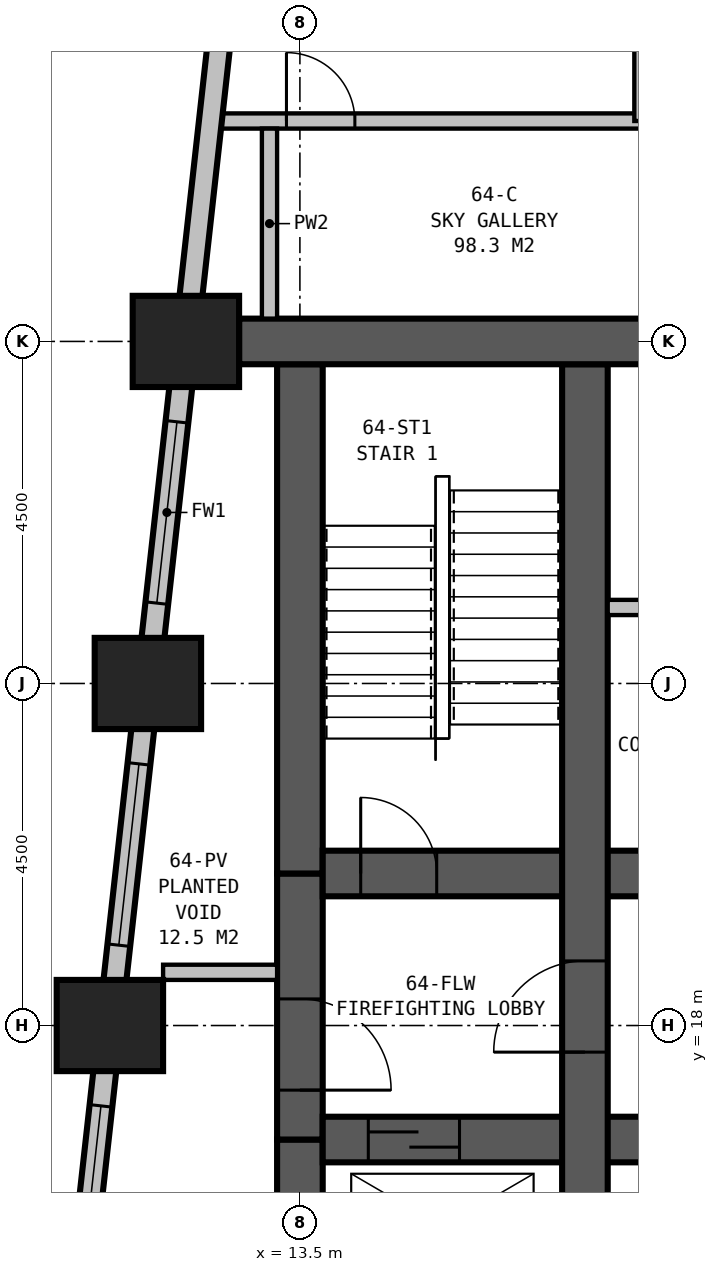
"""IFC4 building model, lengths in metres.
Left out: names, types, materials, properties, quantities, classifications, styles, units other than length and angle.
Written with IfcOpenShell. Run it as: python <this file> out.ifc"""

import sys

from ifc_helpers import new_model, si_unit, direction, frame, frame_2d, origin, origin_2d, place, context, subcontext, project, spatial, rectangle, extrude, element, fill, save


model = new_model("IFC4")
c1 = context("Model", 3, precision=1e-05, world=origin(), true_north=direction((0.0, 1.0)))
c2 = subcontext(c1, "Body", "Model", "MODEL_VIEW")
j1 = project(units=[si_unit("LENGTHUNIT", "METRE"), si_unit("PLANEANGLEUNIT", "RADIAN")], contexts=[c1])
p1 = place(None, origin())
s1 = spatial("IfcSite", under=j1, at=p1, CompositionType="ELEMENT")
p2 = place(p1, origin())
s2 = spatial("IfcBuilding", under=s1, at=p2, CompositionType="ELEMENT")
p3 = place(p2, frame((0.0, 0.0, 250.7)))
s3 = spatial("IfcBuildingStorey", under=s2, at=p3, CompositionType="ELEMENT", Elevation=250.7)
for number, where, z_axis, x_axis in (
    (1, (12.0, 27.0, 0.0), (0.0, 0.0, 1.0), (1.0, 0.0, 0.0)),
    (2, (11.5, 22.5, 0.0), (0.0, 0.0, 1.0), (1.0, 0.0, 0.0)),
    (3, (11.0, 18.0, 0.0), (0.0, 0.0, 1.0), (1.0, 0.0, 0.0)),
):
    element("IfcColumn", number, at=place(p3, frame(where, z_axis=z_axis, x_axis=x_axis)), inside=s3, PredefinedType="COLUMN", context=c2, shape_type="SweptSolid", body=[
        extrude(rectangle(XDim=1.4, YDim=1.2, at=origin_2d()), origin(), (0.0, 0.0, 1.0), 3.9),
    ])
p4 = place(p3, frame((36.3, 27.0, 0.0), z_axis=(0.0, 0.0, 1.0), x_axis=(-1.0, 0.0, 0.0)))
e4 = element("IfcWall", 4, at=p4, inside=s3, PredefinedType="SHEAR", context=c2, shape_type="SweptSolid", body=[
    extrude(rectangle(XDim=23.6, YDim=0.6, at=frame_2d((11.8, 0.0))), origin(), (0.0, 0.0, 1.0), 3.9),
])
p5 = place(p4, frame((17.05, 0.0, 0.0)))
e5 = element("IfcOpeningElement", 5, at=p5, cuts=e4, PredefinedType="OPENING", context=c2, shape_type="SweptSolid", body=[
    extrude(rectangle(XDim=1.0, YDim=2.1, at=frame_2d((0.5, 1.05))), frame((0.0, 0.31, 0.0), z_axis=(0.0, -1.0, 0.0), x_axis=(1.0, 0.0, 0.0)), (0.0, 0.0, 1.0), 0.62),
])
p6 = place(p4, frame((12.05, 0.0, 0.0)))
e6 = element("IfcOpeningElement", 6, at=p6, cuts=e4, PredefinedType="OPENING", context=c2, shape_type="SweptSolid", body=[
    extrude(rectangle(XDim=1.0, YDim=2.1, at=frame_2d((0.5, 1.05))), frame((0.0, 0.31, 0.0), z_axis=(0.0, -1.0, 0.0), x_axis=(1.0, 0.0, 0.0)), (0.0, 0.0, 1.0), 0.62),
])
p7 = place(p4, frame((7.05, 0.0, 0.0)))
e7 = element("IfcOpeningElement", 7, at=p7, cuts=e4, PredefinedType="OPENING", context=c2, shape_type="SweptSolid", body=[
    extrude(rectangle(XDim=1.0, YDim=2.1, at=frame_2d((0.5, 1.05))), frame((0.0, 0.31, 0.0), z_axis=(0.0, -1.0, 0.0), x_axis=(1.0, 0.0, 0.0)), (0.0, 0.0, 1.0), 0.62),
])
p8 = place(p3, frame((17.25, 13.8, 0.0), z_axis=(0.0, 0.0, 1.0), x_axis=(0.0, 1.0, 0.0)))
e8 = element("IfcWall", 8, at=p8, inside=s3, PredefinedType="SHEAR", context=c2, shape_type="SweptSolid", body=[
    extrude(rectangle(XDim=12.9, YDim=0.6, at=frame_2d((6.45, 0.0))), origin(), (0.0, 0.0, 1.0), 3.9),
])
p9 = place(p8, frame((3.85, 0.0, 0.0)))
e9 = element("IfcOpeningElement", 9, at=p9, cuts=e8, PredefinedType="OPENING", context=c2, shape_type="SweptSolid", body=[
    extrude(rectangle(XDim=1.2, YDim=2.1, at=frame_2d((0.6, 1.05))), frame((0.0, 0.31, 0.0), z_axis=(0.0, -1.0, 0.0), x_axis=(1.0, 0.0, 0.0)), (0.0, 0.0, 1.0), 0.62),
])
p10 = place(p3, frame((13.8, 16.5, 0.0), z_axis=(0.0, 0.0, 1.0), x_axis=(1.0, 0.0, 0.0)))
e10 = element("IfcWall", 10, at=p10, inside=s3, PredefinedType="SHEAR", context=c2, shape_type="SweptSolid", body=[
    extrude(rectangle(XDim=21.9, YDim=0.6, at=frame_2d((10.95, 0.0))), origin(), (0.0, 0.0, 1.0), 3.9),
])
p11 = place(p10, frame((5.75, 0.0, 0.0), z_axis=(0.0, 0.0, 1.0), x_axis=(-1.0, 0.0, 0.0)))
e11 = element("IfcOpeningElement", 11, at=p11, cuts=e10, PredefinedType="OPENING", context=c2, shape_type="SweptSolid", body=[
    extrude(rectangle(XDim=1.0, YDim=2.1, at=frame_2d((0.5, 1.05))), frame((0.0, 0.31, 0.0), z_axis=(0.0, -1.0, 0.0), x_axis=(1.0, 0.0, 0.0)), (0.0, 0.0, 1.0), 0.62),
])
p12 = place(p10, frame((10.2, 0.0, 0.0), z_axis=(0.0, 0.0, 1.0), x_axis=(-1.0, 0.0, 0.0)))
e12 = element("IfcOpeningElement", 12, at=p12, cuts=e10, PredefinedType="OPENING", context=c2, shape_type="SweptSolid", body=[
    extrude(rectangle(XDim=1.0, YDim=2.1, at=frame_2d((0.5, 1.05))), frame((0.0, 0.31, 0.0), z_axis=(0.0, -1.0, 0.0), x_axis=(1.0, 0.0, 0.0)), (0.0, 0.0, 1.0), 0.62),
])
p13 = place(p10, frame((12.7, 0.0, 0.0), z_axis=(0.0, 0.0, 1.0), x_axis=(-1.0, 0.0, 0.0)))
e13 = element("IfcOpeningElement", 13, at=p13, cuts=e10, PredefinedType="OPENING", context=c2, shape_type="SweptSolid", body=[
    extrude(rectangle(XDim=1.0, YDim=2.1, at=frame_2d((0.5, 1.05))), frame((0.0, 0.31, 0.0), z_axis=(0.0, -1.0, 0.0), x_axis=(1.0, 0.0, 0.0)), (0.0, 0.0, 1.0), 0.62),
])
p14 = place(p10, frame((17.15, 0.0, 0.0), z_axis=(0.0, 0.0, 1.0), x_axis=(-1.0, 0.0, 0.0)))
e14 = element("IfcOpeningElement", 14, at=p14, cuts=e10, PredefinedType="OPENING", context=c2, shape_type="SweptSolid", body=[
    extrude(rectangle(XDim=1.0, YDim=2.1, at=frame_2d((0.5, 1.05))), frame((0.0, 0.31, 0.0), z_axis=(0.0, -1.0, 0.0), x_axis=(1.0, 0.0, 0.0)), (0.0, 0.0, 1.0), 0.62),
])
p15 = place(p10, frame((0.6, 0.0, 0.0)))
e15 = element("IfcOpeningElement", 15, at=p15, cuts=e10, PredefinedType="OPENING", context=c2, shape_type="SweptSolid", body=[
    extrude(rectangle(XDim=1.2, YDim=2.1, at=frame_2d((0.6, 1.05))), frame((0.0, 0.31, 0.0), z_axis=(0.0, -1.0, 0.0), x_axis=(1.0, 0.0, 0.0)), (0.0, 0.0, 1.0), 0.62),
])
p16 = place(p10, frame((19.6, 0.0, 0.0)))
e16 = element("IfcOpeningElement", 16, at=p16, cuts=e10, PredefinedType="OPENING", context=c2, shape_type="SweptSolid", body=[
    extrude(rectangle(XDim=1.2, YDim=2.1, at=frame_2d((0.6, 1.05))), frame((0.0, 0.31, 0.0), z_axis=(0.0, -1.0, 0.0), x_axis=(1.0, 0.0, 0.0)), (0.0, 0.0, 1.0), 0.62),
])
p17 = place(p3, frame((13.8, 20.0, 0.0), z_axis=(0.0, 0.0, 1.0), x_axis=(1.0, 0.0, 0.0)))
e17 = element("IfcWall", 17, at=p17, inside=s3, PredefinedType="SHEAR", context=c2, shape_type="SweptSolid", body=[
    extrude(rectangle(XDim=21.9, YDim=0.6, at=frame_2d((10.95, 0.0))), origin(), (0.0, 0.0, 1.0), 3.9),
])
p18 = place(p17, frame((0.5, 0.0, 0.0)))
e18 = element("IfcOpeningElement", 18, at=p18, cuts=e17, PredefinedType="OPENING", context=c2, shape_type="SweptSolid", body=[
    extrude(rectangle(XDim=1.0, YDim=2.1, at=frame_2d((0.5, 1.05))), frame((0.0, 0.31, 0.0), z_axis=(0.0, -1.0, 0.0), x_axis=(1.0, 0.0, 0.0)), (0.0, 0.0, 1.0), 0.62),
])
p19 = place(p17, frame((20.5, 0.0, 0.0)))
e19 = element("IfcOpeningElement", 19, at=p19, cuts=e17, PredefinedType="OPENING", context=c2, shape_type="SweptSolid", body=[
    extrude(rectangle(XDim=1.0, YDim=2.1, at=frame_2d((0.5, 1.05))), frame((0.0, 0.31, 0.0), z_axis=(0.0, -1.0, 0.0), x_axis=(1.0, 0.0, 0.0)), (0.0, 0.0, 1.0), 0.62),
])
p20 = place(p17, frame((9.15, 0.0, 0.0)))
e20 = element("IfcOpeningElement", 20, at=p20, cuts=e17, PredefinedType="OPENING", context=c2, shape_type="SweptSolid", body=[
    extrude(rectangle(XDim=1.1, YDim=2.1, at=frame_2d((0.55, 1.05))), frame((0.0, 0.31, 0.0), z_axis=(0.0, -1.0, 0.0), x_axis=(1.0, 0.0, 0.0)), (0.0, 0.0, 1.0), 0.62),
])
p21 = place(p17, frame((11.65, 0.0, 0.0)))
e21 = element("IfcOpeningElement", 21, at=p21, cuts=e17, PredefinedType="OPENING", context=c2, shape_type="SweptSolid", body=[
    extrude(rectangle(XDim=1.1, YDim=2.1, at=frame_2d((0.55, 1.05))), frame((0.0, 0.31, 0.0), z_axis=(0.0, -1.0, 0.0), x_axis=(1.0, 0.0, 0.0)), (0.0, 0.0, 1.0), 0.62),
])
p22 = place(p17, frame((14.15, 0.0, 0.0)))
e22 = element("IfcOpeningElement", 22, at=p22, cuts=e17, PredefinedType="OPENING", context=c2, shape_type="SweptSolid", body=[
    extrude(rectangle(XDim=1.1, YDim=2.1, at=frame_2d((0.55, 1.05))), frame((0.0, 0.31, 0.0), z_axis=(0.0, -1.0, 0.0), x_axis=(1.0, 0.0, 0.0)), (0.0, 0.0, 1.0), 0.62),
])
p23 = place(p17, frame((16.65, 0.0, 0.0)))
e23 = element("IfcOpeningElement", 23, at=p23, cuts=e17, PredefinedType="OPENING", context=c2, shape_type="SweptSolid", body=[
    extrude(rectangle(XDim=1.1, YDim=2.1, at=frame_2d((0.55, 1.05))), frame((0.0, 0.31, 0.0), z_axis=(0.0, -1.0, 0.0), x_axis=(1.0, 0.0, 0.0)), (0.0, 0.0, 1.0), 0.62),
])
p24 = place(p17, frame((5.75, 0.0, 0.0), z_axis=(0.0, 0.0, 1.0), x_axis=(-1.0, 0.0, 0.0)))
e24 = element("IfcOpeningElement", 24, at=p24, cuts=e17, PredefinedType="OPENING", context=c2, shape_type="SweptSolid", body=[
    extrude(rectangle(XDim=1.0, YDim=2.1, at=frame_2d((0.5, 1.05))), frame((0.0, 0.31, 0.0), z_axis=(0.0, -1.0, 0.0), x_axis=(1.0, 0.0, 0.0)), (0.0, 0.0, 1.0), 0.62),
])
p25 = place(p17, frame((6.7, 0.0, 0.0)))
e25 = element("IfcOpeningElement", 25, at=p25, cuts=e17, PredefinedType="OPENING", context=c2, shape_type="SweptSolid", body=[
    extrude(rectangle(XDim=1.0, YDim=2.1, at=frame_2d((0.5, 1.05))), frame((0.0, 0.31, 0.0), z_axis=(0.0, -1.0, 0.0), x_axis=(1.0, 0.0, 0.0)), (0.0, 0.0, 1.0), 0.62),
])
p26 = place(p3, frame((13.5, 26.7, 0.0), z_axis=(0.0, 0.0, 1.0), x_axis=(0.0, -1.0, 0.0)))
e26 = element("IfcWall", 26, at=p26, inside=s3, PredefinedType="SHEAR", context=c2, shape_type="SweptSolid", body=[
    extrude(rectangle(XDim=6.7, YDim=0.6, at=frame_2d((3.35, 0.0))), origin(), (0.0, 0.0, 1.0), 3.9),
])
p27 = place(p3, frame((13.5, 20.0, 0.0), z_axis=(0.0, 0.0, 1.0), x_axis=(0.0, -1.0, 0.0)))
e27 = element("IfcWall", 27, at=p27, inside=s3, PredefinedType="SHEAR", context=c2, shape_type="SweptSolid", body=[
    extrude(rectangle(XDim=3.5, YDim=0.6, at=frame_2d((1.75, 0.0))), origin(), (0.0, 0.0, 1.0), 3.9),
])
p28 = place(p27, frame((1.65, 0.0, 0.0)))
e28 = element("IfcOpeningElement", 28, at=p28, cuts=e27, PredefinedType="OPENING", context=c2, shape_type="SweptSolid", body=[
    extrude(rectangle(XDim=1.2, YDim=2.1, at=frame_2d((0.6, 1.05))), frame((0.0, 0.31, 0.0), z_axis=(0.0, -1.0, 0.0), x_axis=(1.0, 0.0, 0.0)), (0.0, 0.0, 1.0), 0.62),
])
p29 = place(p3, frame((13.5, 16.5, 0.0), z_axis=(0.0, 0.0, 1.0), x_axis=(0.0, -1.0, 0.0)))
e29 = element("IfcWall", 29, at=p29, inside=s3, PredefinedType="SHEAR", context=c2, shape_type="SweptSolid", body=[
    extrude(rectangle(XDim=2.7, YDim=0.6, at=frame_2d((1.35, 0.0))), origin(), (0.0, 0.0, 1.0), 3.9),
])
p30 = place(p3, frame((13.517, 40.649, 0.0), z_axis=(0.0, 0.0, 1.0), x_axis=(-0.110433201132, -0.993883548555, 0.0)))
e30 = element("IfcWall", 30, at=p30, inside=s3, PredefinedType="STANDARD", context=c2, shape_type="SweptSolid", body=[
    extrude(rectangle(XDim=31.994, YDim=0.3, at=frame_2d((15.997, 0.0))), origin(), (0.0, 0.0, 1.0), 2.65),
])
p31 = place(p30, frame((1.214, 0.0, 0.5)))
e31 = element("IfcOpeningElement", 31, at=p31, cuts=e30, PredefinedType="OPENING", context=c2, shape_type="SweptSolid", body=[
    extrude(rectangle(XDim=2.4, YDim=2.0, at=frame_2d((1.2, 1.0))), frame((0.0, 0.16, 0.0), z_axis=(0.0, -1.0, 0.0), x_axis=(1.0, 0.0, 0.0)), (0.0, 0.0, 1.0), 0.32),
])
p32 = place(p30, frame((5.742, 0.0, 0.5)))
e32 = element("IfcOpeningElement", 32, at=p32, cuts=e30, PredefinedType="OPENING", context=c2, shape_type="SweptSolid", body=[
    extrude(rectangle(XDim=2.4, YDim=2.0, at=frame_2d((1.2, 1.0))), frame((0.0, 0.16, 0.0), z_axis=(0.0, -1.0, 0.0), x_axis=(1.0, 0.0, 0.0)), (0.0, 0.0, 1.0), 0.32),
])
p33 = place(p30, frame((14.797, 0.0, 0.5)))
e33 = element("IfcOpeningElement", 33, at=p33, cuts=e30, PredefinedType="OPENING", context=c2, shape_type="SweptSolid", body=[
    extrude(rectangle(XDim=2.4, YDim=2.0, at=frame_2d((1.2, 1.0))), frame((0.0, 0.16, 0.0), z_axis=(0.0, -1.0, 0.0), x_axis=(1.0, 0.0, 0.0)), (0.0, 0.0, 1.0), 0.32),
])
p34 = place(p30, frame((19.325, 0.0, 0.5)))
e34 = element("IfcOpeningElement", 34, at=p34, cuts=e30, PredefinedType="OPENING", context=c2, shape_type="SweptSolid", body=[
    extrude(rectangle(XDim=2.4, YDim=2.0, at=frame_2d((1.2, 1.0))), frame((0.0, 0.16, 0.0), z_axis=(0.0, -1.0, 0.0), x_axis=(1.0, 0.0, 0.0)), (0.0, 0.0, 1.0), 0.32),
])
p35 = place(p30, frame((23.852, 0.0, 0.5)))
e35 = element("IfcOpeningElement", 35, at=p35, cuts=e30, PredefinedType="OPENING", context=c2, shape_type="SweptSolid", body=[
    extrude(rectangle(XDim=2.4, YDim=2.0, at=frame_2d((1.2, 1.0))), frame((0.0, 0.16, 0.0), z_axis=(0.0, -1.0, 0.0), x_axis=(1.0, 0.0, 0.0)), (0.0, 0.0, 1.0), 0.32),
])
p36 = place(p30, frame((28.38, 0.0, 0.5)))
e36 = element("IfcOpeningElement", 36, at=p36, cuts=e30, PredefinedType="OPENING", context=c2, shape_type="SweptSolid", body=[
    extrude(rectangle(XDim=2.4, YDim=2.0, at=frame_2d((1.2, 1.0))), frame((0.0, 0.16, 0.0), z_axis=(0.0, -1.0, 0.0), x_axis=(1.0, 0.0, 0.0)), (0.0, 0.0, 1.0), 0.32),
])
p37 = place(p3, frame((12.473, 29.9, 0.0), z_axis=(0.0, 0.0, 1.0), x_axis=(1.0, 0.0, 0.0)))
e37 = element("IfcWall", 37, at=p37, inside=s3, PredefinedType="PARTITIONING", context=c2, shape_type="SweptSolid", body=[
    extrude(rectangle(XDim=25.827, YDim=0.2, at=frame_2d((12.914, 0.0))), origin(), (0.0, 0.0, 1.0), 3.65),
])
p38 = place(p37, frame((0.85, 0.0, 0.0)))
e38 = element("IfcOpeningElement", 38, at=p38, cuts=e37, PredefinedType="OPENING", context=c2, shape_type="SweptSolid", body=[
    extrude(rectangle(XDim=0.9, YDim=2.1, at=frame_2d((0.45, 1.05))), frame((0.0, 0.11, 0.0), z_axis=(0.0, -1.0, 0.0), x_axis=(1.0, 0.0, 0.0)), (0.0, 0.0, 1.0), 0.22),
])
p39 = place(p37, frame((8.677, 0.0, 0.0)))
e39 = element("IfcOpeningElement", 39, at=p39, cuts=e37, PredefinedType="OPENING", context=c2, shape_type="SweptSolid", body=[
    extrude(rectangle(XDim=0.9, YDim=2.1, at=frame_2d((0.45, 1.05))), frame((0.0, 0.11, 0.0), z_axis=(0.0, -1.0, 0.0), x_axis=(1.0, 0.0, 0.0)), (0.0, 0.0, 1.0), 0.22),
])
p40 = place(p37, frame((13.177, 0.0, 0.0)))
e40 = element("IfcOpeningElement", 40, at=p40, cuts=e37, PredefinedType="OPENING", context=c2, shape_type="SweptSolid", body=[
    extrude(rectangle(XDim=0.9, YDim=2.1, at=frame_2d((0.45, 1.05))), frame((0.0, 0.11, 0.0), z_axis=(0.0, -1.0, 0.0), x_axis=(1.0, 0.0, 0.0)), (0.0, 0.0, 1.0), 0.22),
])
p41 = place(p37, frame((17.677, 0.0, 0.0)))
e41 = element("IfcOpeningElement", 41, at=p41, cuts=e37, PredefinedType="OPENING", context=c2, shape_type="SweptSolid", body=[
    extrude(rectangle(XDim=0.9, YDim=2.1, at=frame_2d((0.45, 1.05))), frame((0.0, 0.11, 0.0), z_axis=(0.0, -1.0, 0.0), x_axis=(1.0, 0.0, 0.0)), (0.0, 0.0, 1.0), 0.22),
])
p42 = place(p37, frame((22.177, 0.0, 0.0)))
e42 = element("IfcOpeningElement", 42, at=p42, cuts=e37, PredefinedType="OPENING", context=c2, shape_type="SweptSolid", body=[
    extrude(rectangle(XDim=0.9, YDim=2.1, at=frame_2d((0.45, 1.05))), frame((0.0, 0.11, 0.0), z_axis=(0.0, -1.0, 0.0), x_axis=(1.0, 0.0, 0.0)), (0.0, 0.0, 1.0), 0.22),
])
p43 = place(p37, frame((24.227, 0.0, 0.0)))
e43 = element("IfcOpeningElement", 43, at=p43, cuts=e37, PredefinedType="OPENING", context=c2, shape_type="SweptSolid", body=[
    extrude(rectangle(XDim=0.9, YDim=2.1, at=frame_2d((0.45, 1.05))), frame((0.0, 0.11, 0.0), z_axis=(0.0, -1.0, 0.0), x_axis=(1.0, 0.0, 0.0)), (0.0, 0.0, 1.0), 0.22),
])
p44 = place(p3, frame((13.2, 18.7, 0.0), z_axis=(0.0, 0.0, 1.0), x_axis=(-1.0, 0.0, 0.0)))
e44 = element("IfcWall", 44, at=p44, inside=s3, PredefinedType="PARTITIONING", context=c2, shape_type="SweptSolid", body=[
    extrude(rectangle(XDim=1.5, YDim=0.2, at=frame_2d((0.75, 0.0))), origin(), (0.0, 0.0, 1.0), 3.65),
])
p45 = place(p3, frame((13.1, 27.3, 0.0), z_axis=(0.0, 0.0, 1.0), x_axis=(0.0, 1.0, 0.0)))
e45 = element("IfcWall", 45, at=p45, inside=s3, PredefinedType="PARTITIONING", context=c2, shape_type="SweptSolid", body=[
    extrude(rectangle(XDim=2.5, YDim=0.2, at=frame_2d((1.25, 0.0))), origin(), (0.0, 0.0, 1.0), 3.65),
])
p46 = place(p3, frame((18.0, 29.9, 0.0), z_axis=(0.0, 0.0, 1.0), x_axis=(0.0, 1.0, 0.0)))
e46 = element("IfcWall", 46, at=p46, inside=s3, PredefinedType="PARTITIONING", context=c2, shape_type="SweptSolid", body=[
    extrude(rectangle(XDim=10.6, YDim=0.2, at=frame_2d((5.3, 0.0))), origin(), (0.0, 0.0, 1.0), 2.65),
])
p47 = place(p3, frame((17.55, 23.5, 0.0), z_axis=(0.0, 0.0, 1.0), x_axis=(1.0, 0.0, 0.0)))
e47 = element("IfcWall", 47, at=p47, inside=s3, PredefinedType="PARTITIONING", context=c2, shape_type="SweptSolid", body=[
    extrude(rectangle(XDim=14.4, YDim=0.2, at=frame_2d((7.2, 0.0))), origin(), (0.0, 0.0, 1.0), 3.65),
])
p48 = place(p47, frame((0.45, 0.0, 0.0)))
e48 = element("IfcOpeningElement", 48, at=p48, cuts=e47, PredefinedType="OPENING", context=c2, shape_type="SweptSolid", body=[
    extrude(rectangle(XDim=1.0, YDim=2.1, at=frame_2d((0.5, 1.05))), frame((0.0, 0.11, 0.0), z_axis=(0.0, -1.0, 0.0), x_axis=(1.0, 0.0, 0.0)), (0.0, 0.0, 1.0), 0.22),
])
p49 = place(p33, origin())
e49 = element("IfcWindow", 49, at=p49, inside=s3, PartitioningType="SINGLE_PANEL", PredefinedType="WINDOW", context=c2, shape_type="SweptSolid", body=[
    extrude(rectangle(XDim=2.4, YDim=2.0, at=frame_2d((1.2, 1.0))), frame((0.0, 0.03, 0.0), z_axis=(0.0, -1.0, 0.0), x_axis=(1.0, 0.0, 0.0)), (0.0, 0.0, 1.0), 0.06),
])
fill(e33, e49)
p50 = place(p34, origin())
e50 = element("IfcWindow", 50, at=p50, inside=s3, PartitioningType="SINGLE_PANEL", PredefinedType="WINDOW", context=c2, shape_type="SweptSolid", body=[
    extrude(rectangle(XDim=2.4, YDim=2.0, at=frame_2d((1.2, 1.0))), frame((0.0, 0.03, 0.0), z_axis=(0.0, -1.0, 0.0), x_axis=(1.0, 0.0, 0.0)), (0.0, 0.0, 1.0), 0.06),
])
fill(e34, e50)
p51 = place(p35, origin())
e51 = element("IfcWindow", 51, at=p51, inside=s3, PartitioningType="SINGLE_PANEL", PredefinedType="WINDOW", context=c2, shape_type="SweptSolid", body=[
    extrude(rectangle(XDim=2.4, YDim=2.0, at=frame_2d((1.2, 1.0))), frame((0.0, 0.03, 0.0), z_axis=(0.0, -1.0, 0.0), x_axis=(1.0, 0.0, 0.0)), (0.0, 0.0, 1.0), 0.06),
])
fill(e35, e51)
p52 = place(p38, origin())
e52 = element("IfcDoor", 52, at=p52, inside=s3, OperationType="SINGLE_SWING_LEFT", PredefinedType="DOOR", context=c2, shape_type="SweptSolid", body=[
    extrude(rectangle(XDim=0.9, YDim=2.1, at=frame_2d((0.45, 1.05))), frame((0.0, 0.025, 0.0), z_axis=(0.0, -1.0, 0.0), x_axis=(1.0, 0.0, 0.0)), (0.0, 0.0, 1.0), 0.05),
])
fill(e38, e52)
p53 = place(p28, origin())
e53 = element("IfcDoor", 53, at=p53, inside=s3, OperationType="SINGLE_SWING_RIGHT", PredefinedType="DOOR", context=c2, shape_type="SweptSolid", body=[
    extrude(rectangle(XDim=1.2, YDim=2.1, at=frame_2d((0.6, 1.05))), frame((0.0, 0.3, 0.0), z_axis=(0.0, -1.0, 0.0), x_axis=(1.0, 0.0, 0.0)), (0.0, 0.0, 1.0), 0.6),
])
fill(e28, e53)
p54 = place(p9, origin())
e54 = element("IfcDoor", 54, at=p54, inside=s3, OperationType="SINGLE_SWING_LEFT", PredefinedType="DOOR", context=c2, shape_type="SweptSolid", body=[
    extrude(rectangle(XDim=1.2, YDim=2.1, at=frame_2d((0.6, 1.05))), frame((0.0, 0.3, 0.0), z_axis=(0.0, -1.0, 0.0), x_axis=(1.0, 0.0, 0.0)), (0.0, 0.0, 1.0), 0.6),
])
fill(e9, e54)
p55 = place(p18, origin())
e55 = element("IfcDoor", 55, at=p55, inside=s3, OperationType="SINGLE_SWING_LEFT", PredefinedType="DOOR", context=c2, shape_type="SweptSolid", body=[
    extrude(rectangle(XDim=1.0, YDim=2.1, at=frame_2d((0.5, 1.05))), frame((0.0, 0.3, 0.0), z_axis=(0.0, -1.0, 0.0), x_axis=(1.0, 0.0, 0.0)), (0.0, 0.0, 1.0), 0.6),
])
fill(e18, e55)
p56 = place(p15, origin())
e56 = element("IfcDoor", 56, at=p56, inside=s3, OperationType="SLIDING_TO_LEFT", PredefinedType="DOOR", context=c2, shape_type="SweptSolid", body=[
    extrude(rectangle(XDim=1.2, YDim=2.1, at=frame_2d((0.6, 1.05))), frame((0.0, 0.3, 0.0), z_axis=(0.0, -1.0, 0.0), x_axis=(1.0, 0.0, 0.0)), (0.0, 0.0, 1.0), 0.6),
])
fill(e15, e56)
save(model, sys.argv[1])
